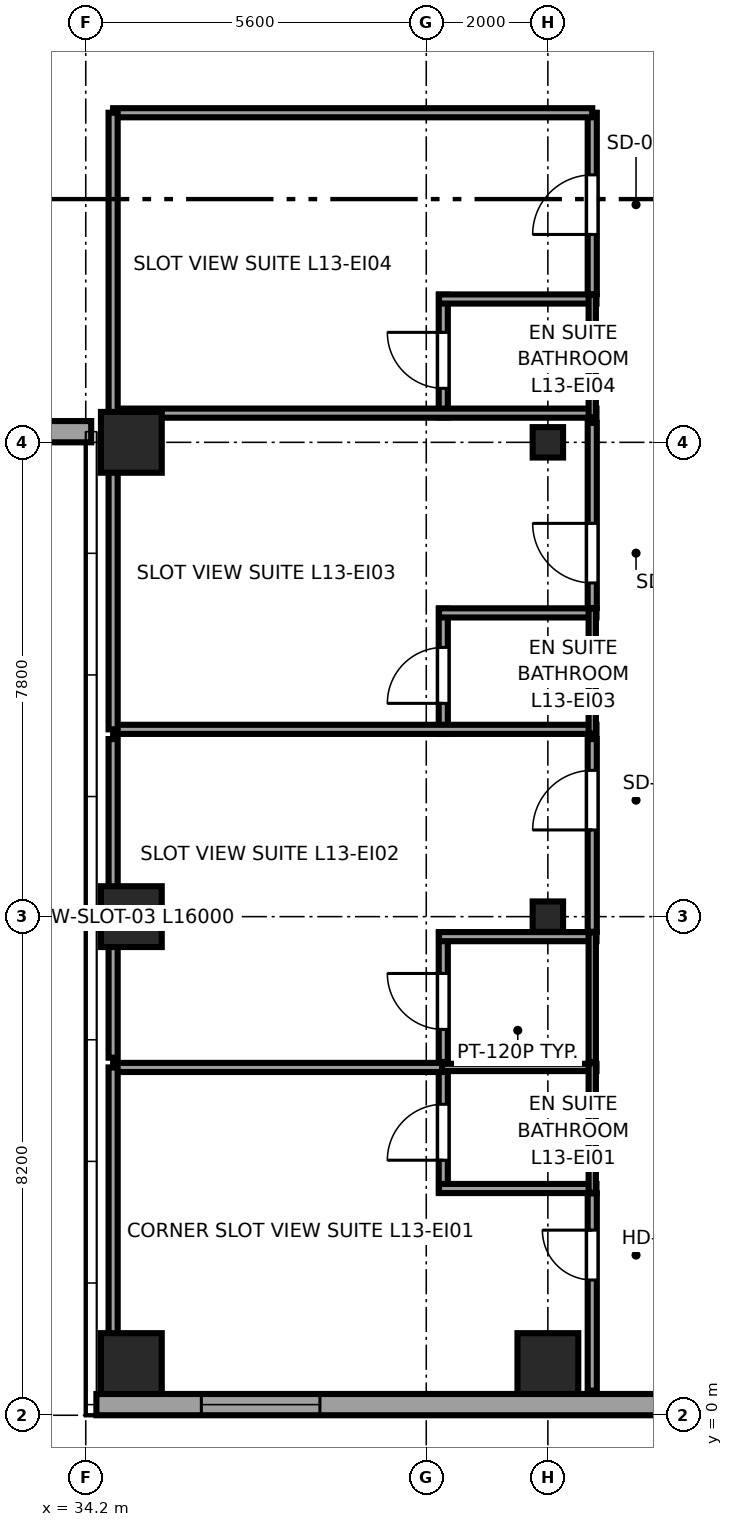
"""IFC4 building model, lengths in metres.
Left out: names, types, materials, properties, quantities, classifications, styles, units other than length and angle.
Written with IfcOpenShell. Run it as: python <this file> out.ifc"""

import sys

from ifc_helpers import new_model, si_unit, direction, frame, frame_2d, origin, origin_2d, place, context, subcontext, project, spatial, rectangle, i_section, extrude, source, transform, mapped, element, fill, save


model = new_model("IFC4")
c1 = context("Model", 3, precision=1e-05, world=origin(), true_north=direction((0.0, 1.0)))
c2 = subcontext(c1, "Body", "Model", "MODEL_VIEW")
j1 = project(units=[si_unit("LENGTHUNIT", "METRE"), si_unit("PLANEANGLEUNIT", "RADIAN")], contexts=[c1])
p1 = place(None, origin())
s1 = spatial("IfcSite", under=j1, at=p1, CompositionType="ELEMENT")
p2 = place(p1, origin())
s2 = spatial("IfcBuilding", under=s1, at=p2, CompositionType="ELEMENT")
p3 = place(p2, frame((0.0, 0.0, 56.85)))
s3 = spatial("IfcBuildingStorey", under=s2, at=p3, CompositionType="ELEMENT", Elevation=56.85)
m1 = source(origin(), c2, "Body", "SweptSolid", [
    extrude(rectangle(XDim=1.0, YDim=1.0, at=origin_2d()), origin(), (0.0, 0.0, 1.0), 3.55),
])
for number, where, z_axis, x_axis in (
    (1, (34.95, 0.85, 0.0), (0.0, 0.0, 1.0), (1.0, 0.0, 0.0)),
    (2, (34.95, 8.2, 0.0), (0.0, 0.0, 1.0), (1.0, 0.0, 0.0)),
    (3, (34.95, 16.0, 0.0), (0.0, 0.0, 1.0), (1.0, 0.0, 0.0)),
    (4, (41.8, 0.85, 0.0), (0.0, 0.0, 1.0), (1.0, 0.0, 0.0)),
):
    element("IfcColumn", number, at=place(p3, frame(where, z_axis=z_axis, x_axis=x_axis)), inside=s3, PredefinedType="COLUMN", context=c2, shape_type="MappedRepresentation", body=[
        mapped(m1, transform((0.0, 0.0, 0.0), x_axis=(1.0, 0.0, 0.0), y_axis=(0.0, 1.0, 0.0), z_axis=(0.0, 0.0, 1.0), scale=1.0)),
    ])
m2 = source(origin(), c2, "Body", "SweptSolid", [
    extrude(i_section(OverallWidth=0.5, OverallDepth=0.5, WebThickness=0.028, FlangeThickness=0.045, at=origin_2d()), origin(), (0.0, 0.0, 1.0), 3.55),
])
for number, where, z_axis, x_axis in (
    (5, (41.8, 8.2, 0.0), (0.0, 0.0, 1.0), (1.0, 0.0, 0.0)),
    (6, (41.8, 16.0, 0.0), (0.0, 0.0, 1.0), (1.0, 0.0, 0.0)),
):
    element("IfcColumn", number, at=place(p3, frame(where, z_axis=z_axis, x_axis=x_axis)), inside=s3, PredefinedType="COLUMN", context=c2, shape_type="MappedRepresentation", body=[
        mapped(m2, transform((0.0, 0.0, 0.0), x_axis=(1.0, 0.0, 0.0), y_axis=(0.0, 1.0, 0.0), z_axis=(0.0, 0.0, 1.0), scale=1.0)),
    ])
p4 = place(p3, frame((22.71, 16.175, 0.0), z_axis=(0.0, 0.0, 1.0), x_axis=(1.0, 0.0, 0.0)))
e7 = element("IfcWall", 7, at=p4, inside=s3, PredefinedType="SOLIDWALL", context=c2, shape_type="SweptSolid", body=[
    extrude(rectangle(XDim=11.58, YDim=0.35, at=frame_2d((5.79, 0.0))), origin(), (0.0, 0.0, 1.0), 2.748),
])
p5 = place(p4, frame((2.22, 0.0, 0.68)))
e8 = element("IfcOpeningElement", 8, at=p5, cuts=e7, PredefinedType="OPENING", context=c2, shape_type="SweptSolid", body=[
    extrude(rectangle(XDim=1.95, YDim=1.82, at=frame_2d((0.975, 0.91))), frame((0.0, 0.185, 0.0), z_axis=(0.0, -1.0, 0.0), x_axis=(1.0, 0.0, 0.0)), (0.0, 0.0, 1.0), 0.37),
])
p6 = place(p4, frame((7.41, 0.0, 0.68)))
e9 = element("IfcOpeningElement", 9, at=p6, cuts=e7, PredefinedType="OPENING", context=c2, shape_type="SweptSolid", body=[
    extrude(rectangle(XDim=1.95, YDim=1.82, at=frame_2d((0.975, 0.91))), frame((0.0, 0.185, 0.0), z_axis=(0.0, -1.0, 0.0), x_axis=(1.0, 0.0, 0.0)), (0.0, 0.0, 1.0), 0.37),
])
p7 = place(p3, frame((34.375, 0.175, 0.0), z_axis=(0.0, 0.0, 1.0), x_axis=(1.0, 0.0, 0.0)))
e10 = element("IfcWall", 10, at=p7, inside=s3, PredefinedType="SOLIDWALL", context=c2, shape_type="SweptSolid", body=[
    extrude(rectangle(XDim=18.008, YDim=0.35, at=frame_2d((9.004, 0.0))), origin(), (0.0, 0.0, 1.0), 3.37),
])
p8 = place(p7, frame((1.726, 0.0, 0.68)))
e11 = element("IfcOpeningElement", 11, at=p8, cuts=e10, PredefinedType="OPENING", context=c2, shape_type="SweptSolid", body=[
    extrude(rectangle(XDim=1.95, YDim=1.82, at=frame_2d((0.975, 0.91))), frame((0.0, 0.185, 0.0), z_axis=(0.0, -1.0, 0.0), x_axis=(1.0, 0.0, 0.0)), (0.0, 0.0, 1.0), 0.37),
])
p9 = place(p7, frame((10.68, 0.0, 0.68)))
e12 = element("IfcOpeningElement", 12, at=p9, cuts=e10, PredefinedType="OPENING", context=c2, shape_type="SweptSolid", body=[
    extrude(rectangle(XDim=1.95, YDim=1.82, at=frame_2d((0.975, 0.91))), frame((0.0, 0.185, 0.0), z_axis=(0.0, -1.0, 0.0), x_axis=(1.0, 0.0, 0.0)), (0.0, 0.0, 1.0), 0.37),
])
p10 = place(p3, frame((40.08, 3.659, 0.0), z_axis=(0.0, 0.0, 1.0), x_axis=(0.0, 1.0, 0.0)))
e13 = element("IfcWall", 13, at=p10, inside=s3, PredefinedType="PARTITIONING", context=c2, shape_type="SweptSolid", body=[
    extrude(rectangle(XDim=2.131, YDim=0.15, at=frame_2d((1.065, 0.0))), origin(), (0.0, 0.0, 1.0), 3.37),
])
p11 = place(p10, frame((0.535, 0.0, 0.0)))
e14 = element("IfcOpeningElement", 14, at=p11, cuts=e13, PredefinedType="OPENING", context=c2, shape_type="SweptSolid", body=[
    extrude(rectangle(XDim=0.92, YDim=2.01, at=frame_2d((0.46, 1.005))), frame((0.0, 0.085, 0.0), z_axis=(0.0, -1.0, 0.0), x_axis=(1.0, 0.0, 0.0)), (0.0, 0.0, 1.0), 0.17),
])
p12 = place(p3, frame((40.01, 3.729, 0.0), z_axis=(0.0, 0.0, 1.0), x_axis=(1.0, 0.0, 0.0)))
e15 = element("IfcWall", 15, at=p12, inside=s3, PredefinedType="PARTITIONING", context=c2, shape_type="SweptSolid", body=[
    extrude(rectangle(XDim=2.59, YDim=0.15, at=frame_2d((1.295, 0.0))), origin(), (0.0, 0.0, 1.0), 3.37),
])
p13 = place(p3, frame((40.01, 5.72, 0.0), z_axis=(0.0, 0.0, 1.0), x_axis=(1.0, 0.0, 0.0)))
e16 = element("IfcWall", 16, at=p13, inside=s3, PredefinedType="PLUMBINGWALL", context=c2, shape_type="SweptSolid", body=[
    extrude(rectangle(XDim=2.59, YDim=0.12, at=frame_2d((1.295, 0.0))), origin(), (0.0, 0.0, 1.0), 3.37),
])
p14 = place(p3, frame((42.53, 3.659, 0.0), z_axis=(0.0, 0.0, 1.0), x_axis=(0.0, 1.0, 0.0)))
e17 = element("IfcWall", 17, at=p14, inside=s3, PredefinedType="PLUMBINGWALL", context=c2, shape_type="SweptSolid", body=[
    extrude(rectangle(XDim=2.131, YDim=0.12, at=frame_2d((1.065, 0.0))), origin(), (0.0, 0.0, 1.0), 3.37),
])
p15 = place(p3, frame((40.08, 5.81, 0.0), z_axis=(0.0, 0.0, 1.0), x_axis=(0.0, 1.0, 0.0)))
e18 = element("IfcWall", 18, at=p15, inside=s3, PredefinedType="PARTITIONING", context=c2, shape_type="SweptSolid", body=[
    extrude(rectangle(XDim=2.131, YDim=0.15, at=frame_2d((1.065, 0.0))), origin(), (0.0, 0.0, 1.0), 3.37),
])
p16 = place(p15, frame((0.535, 0.0, 0.0)))
e19 = element("IfcOpeningElement", 19, at=p16, cuts=e18, PredefinedType="OPENING", context=c2, shape_type="SweptSolid", body=[
    extrude(rectangle(XDim=0.92, YDim=2.01, at=frame_2d((0.46, 1.005))), frame((0.0, 0.085, 0.0), z_axis=(0.0, -1.0, 0.0), x_axis=(1.0, 0.0, 0.0)), (0.0, 0.0, 1.0), 0.17),
])
p17 = place(p3, frame((40.01, 7.871, 0.0), z_axis=(0.0, 0.0, 1.0), x_axis=(1.0, 0.0, 0.0)))
e20 = element("IfcWall", 20, at=p17, inside=s3, PredefinedType="PARTITIONING", context=c2, shape_type="SweptSolid", body=[
    extrude(rectangle(XDim=2.59, YDim=0.15, at=frame_2d((1.295, 0.0))), origin(), (0.0, 0.0, 1.0), 3.37),
])
p18 = place(p3, frame((42.53, 5.81, 0.0), z_axis=(0.0, 0.0, 1.0), x_axis=(0.0, 1.0, 0.0)))
e21 = element("IfcWall", 21, at=p18, inside=s3, PredefinedType="PLUMBINGWALL", context=c2, shape_type="SweptSolid", body=[
    extrude(rectangle(XDim=2.131, YDim=0.12, at=frame_2d((1.065, 0.0))), origin(), (0.0, 0.0, 1.0), 3.37),
])
p19 = place(p3, frame((40.08, 11.21, 0.0), z_axis=(0.0, 0.0, 1.0), x_axis=(0.0, 1.0, 0.0)))
e22 = element("IfcWall", 22, at=p19, inside=s3, PredefinedType="PARTITIONING", context=c2, shape_type="SweptSolid", body=[
    extrude(rectangle(XDim=2.055, YDim=0.15, at=frame_2d((1.027, 0.0))), origin(), (0.0, 0.0, 1.0), 3.37),
])
p20 = place(p19, frame((0.498, 0.0, 0.0)))
e23 = element("IfcOpeningElement", 23, at=p20, cuts=e22, PredefinedType="OPENING", context=c2, shape_type="SweptSolid", body=[
    extrude(rectangle(XDim=0.92, YDim=2.01, at=frame_2d((0.46, 1.005))), frame((0.0, 0.085, 0.0), z_axis=(0.0, -1.0, 0.0), x_axis=(1.0, 0.0, 0.0)), (0.0, 0.0, 1.0), 0.17),
])
p21 = place(p3, frame((34.65, 11.28, 0.0), z_axis=(0.0, 0.0, 1.0), x_axis=(1.0, 0.0, 0.0)))
e24 = element("IfcWall", 24, at=p21, inside=s3, PredefinedType="PARTITIONING", context=c2, shape_type="SweptSolid", body=[
    extrude(rectangle(XDim=7.95, YDim=0.15, at=frame_2d((3.975, 0.0))), origin(), (0.0, 0.0, 1.0), 3.37),
])
p22 = place(p3, frame((40.01, 13.195, 0.0), z_axis=(0.0, 0.0, 1.0), x_axis=(1.0, 0.0, 0.0)))
e25 = element("IfcWall", 25, at=p22, inside=s3, PredefinedType="PARTITIONING", context=c2, shape_type="SweptSolid", body=[
    extrude(rectangle(XDim=2.59, YDim=0.15, at=frame_2d((1.295, 0.0))), origin(), (0.0, 0.0, 1.0), 3.37),
])
p23 = place(p3, frame((42.53, 11.21, 0.0), z_axis=(0.0, 0.0, 1.0), x_axis=(0.0, 1.0, 0.0)))
e26 = element("IfcWall", 26, at=p23, inside=s3, PredefinedType="PLUMBINGWALL", context=c2, shape_type="SweptSolid", body=[
    extrude(rectangle(XDim=2.055, YDim=0.12, at=frame_2d((1.027, 0.0))), origin(), (0.0, 0.0, 1.0), 3.37),
])
p24 = place(p3, frame((40.08, 16.41, 0.0), z_axis=(0.0, 0.0, 1.0), x_axis=(0.0, 1.0, 0.0)))
e27 = element("IfcWall", 27, at=p24, inside=s3, PredefinedType="PARTITIONING", context=c2, shape_type="SweptSolid", body=[
    extrude(rectangle(XDim=2.017, YDim=0.15, at=frame_2d((1.009, 0.0))), origin(), (0.0, 0.0, 1.0), 3.37),
])
p25 = place(p24, frame((0.479, 0.0, 0.0)))
e28 = element("IfcOpeningElement", 28, at=p25, cuts=e27, PredefinedType="OPENING", context=c2, shape_type="SweptSolid", body=[
    extrude(rectangle(XDim=0.92, YDim=2.01, at=frame_2d((0.46, 1.005))), frame((0.0, 0.085, 0.0), z_axis=(0.0, -1.0, 0.0), x_axis=(1.0, 0.0, 0.0)), (0.0, 0.0, 1.0), 0.17),
])
p26 = place(p3, frame((34.65, 16.48, 0.0), z_axis=(0.0, 0.0, 1.0), x_axis=(1.0, 0.0, 0.0)))
e29 = element("IfcWall", 29, at=p26, inside=s3, PredefinedType="PARTITIONING", context=c2, shape_type="SweptSolid", body=[
    extrude(rectangle(XDim=7.95, YDim=0.15, at=frame_2d((3.975, 0.0))), origin(), (0.0, 0.0, 1.0), 3.37),
])
p27 = place(p3, frame((40.01, 18.357, 0.0), z_axis=(0.0, 0.0, 1.0), x_axis=(1.0, 0.0, 0.0)))
e30 = element("IfcWall", 30, at=p27, inside=s3, PredefinedType="PARTITIONING", context=c2, shape_type="SweptSolid", body=[
    extrude(rectangle(XDim=2.59, YDim=0.15, at=frame_2d((1.295, 0.0))), origin(), (0.0, 0.0, 1.0), 3.37),
])
p28 = place(p3, frame((42.53, 16.41, 0.0), z_axis=(0.0, 0.0, 1.0), x_axis=(0.0, 1.0, 0.0)))
e31 = element("IfcWall", 31, at=p28, inside=s3, PredefinedType="PLUMBINGWALL", context=c2, shape_type="SweptSolid", body=[
    extrude(rectangle(XDim=2.017, YDim=0.12, at=frame_2d((1.009, 0.0))), origin(), (0.0, 0.0, 1.0), 3.37),
])
p29 = place(p3, frame((42.53, 0.405, 0.0), z_axis=(0.0, 0.0, 1.0), x_axis=(0.0, 1.0, 0.0)))
e32 = element("IfcWall", 32, at=p29, inside=s3, PredefinedType="PARTITIONING", context=c2, shape_type="SweptSolid", body=[
    extrude(rectangle(XDim=3.244, YDim=0.15, at=frame_2d((1.622, 0.0))), origin(), (0.0, 0.0, 1.0), 3.37),
])
p30 = place(p29, frame((1.82, 0.0, 0.0)))
e33 = element("IfcOpeningElement", 33, at=p30, cuts=e32, PredefinedType="OPENING", context=c2, shape_type="SweptSolid", body=[
    extrude(rectangle(XDim=0.82, YDim=2.01, at=frame_2d((0.41, 1.005))), frame((0.0, 0.085, 0.0), z_axis=(0.0, -1.0, 0.0), x_axis=(1.0, 0.0, 0.0)), (0.0, 0.0, 1.0), 0.17),
])
p31 = place(p3, frame((34.65, 5.72, 0.0), z_axis=(0.0, 0.0, 1.0), x_axis=(1.0, 0.0, 0.0)))
e34 = element("IfcWall", 34, at=p31, inside=s3, PredefinedType="PARTITIONING", context=c2, shape_type="SweptSolid", body=[
    extrude(rectangle(XDim=5.41, YDim=0.15, at=frame_2d((2.705, 0.0))), origin(), (0.0, 0.0, 1.0), 3.37),
])
p32 = place(p3, frame((34.65, 0.405, 0.0), z_axis=(0.0, 0.0, 1.0), x_axis=(0.0, 1.0, 0.0)))
e35 = element("IfcWall", 35, at=p32, inside=s3, PredefinedType="PARTITIONING", context=c2, shape_type="SweptSolid", body=[
    extrude(rectangle(XDim=5.315, YDim=0.15, at=frame_2d((2.657, 0.0))), origin(), (0.0, 0.0, 1.0), 3.37),
])
p33 = place(p3, frame((42.53, 7.951, 0.0), z_axis=(0.0, 0.0, 1.0), x_axis=(0.0, 1.0, 0.0)))
e36 = element("IfcWall", 36, at=p33, inside=s3, PredefinedType="PARTITIONING", context=c2, shape_type="SweptSolid", body=[
    extrude(rectangle(XDim=3.169, YDim=0.15, at=frame_2d((1.584, 0.0))), origin(), (0.0, 0.0, 1.0), 3.37),
])
p34 = place(p33, frame((1.675, 0.0, 0.0)))
e37 = element("IfcOpeningElement", 37, at=p34, cuts=e36, PredefinedType="OPENING", context=c2, shape_type="SweptSolid", body=[
    extrude(rectangle(XDim=0.98, YDim=2.12, at=frame_2d((0.49, 1.06))), frame((0.0, 0.085, 0.0), z_axis=(0.0, -1.0, 0.0), x_axis=(1.0, 0.0, 0.0)), (0.0, 0.0, 1.0), 0.17),
])
p35 = place(p3, frame((34.65, 5.88, 0.0), z_axis=(0.0, 0.0, 1.0), x_axis=(0.0, 1.0, 0.0)))
e38 = element("IfcWall", 38, at=p35, inside=s3, PredefinedType="PARTITIONING", context=c2, shape_type="SweptSolid", body=[
    extrude(rectangle(XDim=5.24, YDim=0.15, at=frame_2d((2.62, 0.0))), origin(), (0.0, 0.0, 1.0), 3.37),
])
p36 = place(p3, frame((42.53, 13.275, 0.0), z_axis=(0.0, 0.0, 1.0), x_axis=(0.0, 1.0, 0.0)))
e39 = element("IfcWall", 39, at=p36, inside=s3, PredefinedType="PARTITIONING", context=c2, shape_type="SweptSolid", body=[
    extrude(rectangle(XDim=3.045, YDim=0.15, at=frame_2d((1.522, 0.0))), origin(), (0.0, 0.0, 1.0), 3.37),
])
p37 = place(p36, frame((0.413, 0.0, 0.0)))
e40 = element("IfcOpeningElement", 40, at=p37, cuts=e39, PredefinedType="OPENING", context=c2, shape_type="SweptSolid", body=[
    extrude(rectangle(XDim=0.98, YDim=2.12, at=frame_2d((0.49, 1.06))), frame((0.0, 0.085, 0.0), z_axis=(0.0, -1.0, 0.0), x_axis=(1.0, 0.0, 0.0)), (0.0, 0.0, 1.0), 0.17),
])
p38 = place(p3, frame((34.65, 11.28, 0.0), z_axis=(0.0, 0.0, 1.0), x_axis=(0.0, 1.0, 0.0)))
e41 = element("IfcWall", 41, at=p38, inside=s3, PredefinedType="PARTITIONING", context=c2, shape_type="SweptSolid", body=[
    extrude(rectangle(XDim=5.04, YDim=0.15, at=frame_2d((2.52, 0.0))), origin(), (0.0, 0.0, 1.0), 3.37),
])
p39 = place(p3, frame((42.53, 18.437, 0.0), z_axis=(0.0, 0.0, 1.0), x_axis=(0.0, 1.0, 0.0)))
e42 = element("IfcWall", 42, at=p39, inside=s3, PredefinedType="PARTITIONING", context=c2, shape_type="SweptSolid", body=[
    extrude(rectangle(XDim=2.983, YDim=0.15, at=frame_2d((1.491, 0.0))), origin(), (0.0, 0.0, 1.0), 3.37),
])
p40 = place(p39, frame((0.981, 0.0, 0.0)))
e43 = element("IfcOpeningElement", 43, at=p40, cuts=e42, PredefinedType="OPENING", context=c2, shape_type="SweptSolid", body=[
    extrude(rectangle(XDim=0.98, YDim=2.12, at=frame_2d((0.49, 1.06))), frame((0.0, 0.085, 0.0), z_axis=(0.0, -1.0, 0.0), x_axis=(1.0, 0.0, 0.0)), (0.0, 0.0, 1.0), 0.17),
])
p41 = place(p3, frame((34.65, 21.42, 0.0), z_axis=(0.0, 0.0, 1.0), x_axis=(1.0, 0.0, 0.0)))
e44 = element("IfcWall", 44, at=p41, inside=s3, PredefinedType="PARTITIONING", context=c2, shape_type="SweptSolid", body=[
    extrude(rectangle(XDim=7.88, YDim=0.15, at=frame_2d((3.94, 0.0))), origin(), (0.0, 0.0, 1.0), 3.37),
])
p42 = place(p3, frame((34.65, 16.48, 0.0), z_axis=(0.0, 0.0, 1.0), x_axis=(0.0, 1.0, 0.0)))
e45 = element("IfcWall", 45, at=p42, inside=s3, PredefinedType="PARTITIONING", context=c2, shape_type="SweptSolid", body=[
    extrude(rectangle(XDim=4.94, YDim=0.15, at=frame_2d((2.47, 0.0))), origin(), (0.0, 0.0, 1.0), 3.37),
])
m3 = source(origin(), c2, "Body", "SweptSolid", [
    extrude(rectangle(XDim=1.95, YDim=1.82, at=frame_2d((0.975, 0.91))), frame((0.0, 0.09, 0.0), z_axis=(0.0, -1.0, 0.0), x_axis=(1.0, 0.0, 0.0)), (0.0, 0.0, 1.0), 0.06),
])
p43 = place(p8, origin())
e46 = element("IfcWindow", 46, at=p43, inside=s3, PartitioningType="DOUBLE_PANEL_VERTICAL", PredefinedType="WINDOW", context=c2, shape_type="MappedRepresentation", body=[
    mapped(m3, transform((0.0, 0.0, 0.0), x_axis=(1.0, 0.0, 0.0), y_axis=(0.0, 1.0, 0.0), z_axis=(0.0, 0.0, 1.0), scale=1.0)),
])
fill(e11, e46)
m4 = source(origin(), c2, "Body", "SweptSolid", [
    extrude(rectangle(XDim=0.92, YDim=2.01, at=frame_2d((0.46, 1.005))), frame((0.0, 0.025, 0.0), z_axis=(0.0, -1.0, 0.0), x_axis=(1.0, 0.0, 0.0)), (0.0, 0.0, 1.0), 0.05),
])
p44 = place(p11, origin())
e47 = element("IfcDoor", 47, at=p44, inside=s3, OperationType="SINGLE_SWING_LEFT", PredefinedType="DOOR", context=c2, shape_type="MappedRepresentation", body=[
    mapped(m4, transform((0.0, 0.0, 0.0), x_axis=(1.0, 0.0, 0.0), y_axis=(0.0, 1.0, 0.0), z_axis=(0.0, 0.0, 1.0), scale=1.0)),
])
fill(e14, e47)
p45 = place(p16, origin())
e48 = element("IfcDoor", 48, at=p45, inside=s3, OperationType="SINGLE_SWING_RIGHT", PredefinedType="DOOR", context=c2, shape_type="MappedRepresentation", body=[
    mapped(m4, transform((0.0, 0.0, 0.0), x_axis=(1.0, 0.0, 0.0), y_axis=(0.0, 1.0, 0.0), z_axis=(0.0, 0.0, 1.0), scale=1.0)),
])
fill(e19, e48)
p46 = place(p20, origin())
e49 = element("IfcDoor", 49, at=p46, inside=s3, OperationType="SINGLE_SWING_LEFT", PredefinedType="DOOR", context=c2, shape_type="MappedRepresentation", body=[
    mapped(m4, transform((0.0, 0.0, 0.0), x_axis=(1.0, 0.0, 0.0), y_axis=(0.0, 1.0, 0.0), z_axis=(0.0, 0.0, 1.0), scale=1.0)),
])
fill(e23, e49)
p47 = place(p25, origin())
e50 = element("IfcDoor", 50, at=p47, inside=s3, OperationType="SINGLE_SWING_RIGHT", PredefinedType="DOOR", context=c2, shape_type="MappedRepresentation", body=[
    mapped(m4, transform((0.0, 0.0, 0.0), x_axis=(1.0, 0.0, 0.0), y_axis=(0.0, 1.0, 0.0), z_axis=(0.0, 0.0, 1.0), scale=1.0)),
])
fill(e28, e50)
m5 = source(origin(), c2, "Body", "SweptSolid", [
    extrude(rectangle(XDim=0.82, YDim=2.01, at=frame_2d((0.41, 1.005))), frame((0.0, 0.025, 0.0), z_axis=(0.0, -1.0, 0.0), x_axis=(1.0, 0.0, 0.0)), (0.0, 0.0, 1.0), 0.05),
])
p48 = place(p30, origin())
e51 = element("IfcDoor", 51, at=p48, inside=s3, OperationType="SINGLE_SWING_RIGHT", PredefinedType="DOOR", context=c2, shape_type="MappedRepresentation", body=[
    mapped(m5, transform((0.0, 0.0, 0.0), x_axis=(1.0, 0.0, 0.0), y_axis=(0.0, 1.0, 0.0), z_axis=(0.0, 0.0, 1.0), scale=1.0)),
])
fill(e33, e51)
m6 = source(origin(), c2, "Body", "SweptSolid", [
    extrude(rectangle(XDim=0.98, YDim=2.12, at=frame_2d((0.49, 1.06))), frame((0.0, 0.025, 0.0), z_axis=(0.0, -1.0, 0.0), x_axis=(1.0, 0.0, 0.0)), (0.0, 0.0, 1.0), 0.05),
])
p49 = place(p34, origin())
e52 = element("IfcDoor", 52, at=p49, inside=s3, OperationType="SINGLE_SWING_LEFT", PredefinedType="DOOR", context=c2, shape_type="MappedRepresentation", body=[
    mapped(m6, transform((0.0, 0.0, 0.0), x_axis=(1.0, 0.0, 0.0), y_axis=(0.0, 1.0, 0.0), z_axis=(0.0, 0.0, 1.0), scale=1.0)),
])
fill(e37, e52)
p50 = place(p37, origin())
e53 = element("IfcDoor", 53, at=p50, inside=s3, OperationType="SINGLE_SWING_RIGHT", PredefinedType="DOOR", context=c2, shape_type="MappedRepresentation", body=[
    mapped(m6, transform((0.0, 0.0, 0.0), x_axis=(1.0, 0.0, 0.0), y_axis=(0.0, 1.0, 0.0), z_axis=(0.0, 0.0, 1.0), scale=1.0)),
])
fill(e40, e53)
p51 = place(p40, origin())
e54 = element("IfcDoor", 54, at=p51, inside=s3, OperationType="SINGLE_SWING_LEFT", PredefinedType="DOOR", context=c2, shape_type="MappedRepresentation", body=[
    mapped(m6, transform((0.0, 0.0, 0.0), x_axis=(1.0, 0.0, 0.0), y_axis=(0.0, 1.0, 0.0), z_axis=(0.0, 0.0, 1.0), scale=1.0)),
])
fill(e43, e54)
save(model, sys.argv[1])
